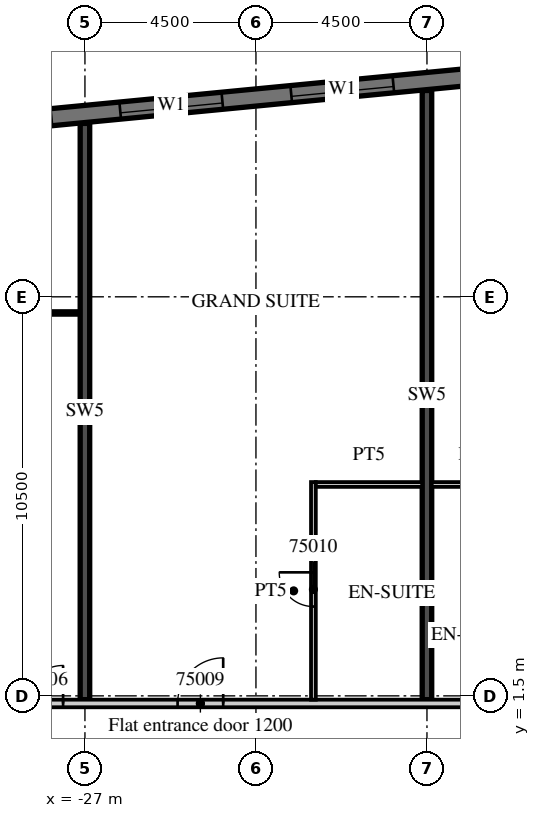
"""IFC4 building model, lengths in metres.
Left out: names, types, materials, properties, quantities, classifications, styles, units other than length and angle.
Written with IfcOpenShell. Run it as: python <this file> out.ifc"""

import sys

from ifc_helpers import new_model, si_unit, direction, frame, frame_2d, origin, place, context, subcontext, project, spatial, rectangle, extrude, element, fill, save


model = new_model("IFC4")
c1 = context("Model", 3, precision=1e-05, world=origin(), true_north=direction((0.0, 1.0)))
c2 = subcontext(c1, "Body", "Model", "MODEL_VIEW")
j1 = project(units=[si_unit("LENGTHUNIT", "METRE"), si_unit("PLANEANGLEUNIT", "RADIAN")], contexts=[c1])
p1 = place(None, origin())
s1 = spatial("IfcSite", under=j1, at=p1, CompositionType="ELEMENT")
p2 = place(p1, origin())
s2 = spatial("IfcBuilding", under=s1, at=p2, CompositionType="ELEMENT")
p3 = place(p2, frame((0.0, 0.0, 298.2)))
s3 = spatial("IfcBuildingStorey", under=s2, at=p3, CompositionType="ELEMENT", Elevation=298.2)
p4 = place(p3, frame((-27.0, 1.4, 0.0), z_axis=(0.0, 0.0, 1.0), x_axis=(0.0, 1.0, 0.0)))
e1 = element("IfcWall", 1, at=p4, inside=s3, PredefinedType="SHEAR", context=c2, shape_type="SweptSolid", body=[
    extrude(rectangle(XDim=15.163, YDim=0.25, at=frame_2d((7.582, 0.0))), origin(), (0.0, 0.0, 1.0), 3.3),
])
p5 = place(p3, frame((-18.0, 1.4, 0.0), z_axis=(0.0, 0.0, 1.0), x_axis=(0.0, 1.0, 0.0)))
e2 = element("IfcWall", 2, at=p5, inside=s3, PredefinedType="SHEAR", context=c2, shape_type="SweptSolid", body=[
    extrude(rectangle(XDim=16.03, YDim=0.25, at=frame_2d((8.015, 0.0))), origin(), (0.0, 0.0, 1.0), 3.3),
])
p6 = place(p3, frame((13.521, 20.713, 0.0), z_axis=(0.0, 0.0, 1.0), x_axis=(-0.995396277313, -0.095844932638, 0.0)))
e3 = element("IfcWall", 3, at=p6, inside=s3, PredefinedType="SOLIDWALL", context=c2, shape_type="SweptSolid", body=[
    extrude(rectangle(XDim=51.495, YDim=0.45, at=frame_2d((25.748, 0.0))), origin(), (0.0, 0.0, 1.0), 3.02),
])
p7 = place(p6, frame((0.91, 0.0, 0.45)))
e4 = element("IfcOpeningElement", 4, at=p7, cuts=e3, PredefinedType="OPENING", context=c2, shape_type="SweptSolid", body=[
    extrude(rectangle(XDim=2.7, YDim=2.25, at=frame_2d((1.35, 1.125))), frame((0.0, 0.235, 0.0), z_axis=(0.0, -1.0, 0.0), x_axis=(1.0, 0.0, 0.0)), (0.0, 0.0, 1.0), 0.47),
])
p8 = place(p6, frame((5.431, 0.0, 0.45)))
e5 = element("IfcOpeningElement", 5, at=p8, cuts=e3, PredefinedType="OPENING", context=c2, shape_type="SweptSolid", body=[
    extrude(rectangle(XDim=2.7, YDim=2.25, at=frame_2d((1.35, 1.125))), frame((0.0, 0.235, 0.0), z_axis=(0.0, -1.0, 0.0), x_axis=(1.0, 0.0, 0.0)), (0.0, 0.0, 1.0), 0.47),
])
p9 = place(p6, frame((9.952, 0.0, 0.45)))
e6 = element("IfcOpeningElement", 6, at=p9, cuts=e3, PredefinedType="OPENING", context=c2, shape_type="SweptSolid", body=[
    extrude(rectangle(XDim=2.7, YDim=2.25, at=frame_2d((1.35, 1.125))), frame((0.0, 0.235, 0.0), z_axis=(0.0, -1.0, 0.0), x_axis=(1.0, 0.0, 0.0)), (0.0, 0.0, 1.0), 0.47),
])
p10 = place(p6, frame((14.473, 0.0, 0.45)))
e7 = element("IfcOpeningElement", 7, at=p10, cuts=e3, PredefinedType="OPENING", context=c2, shape_type="SweptSolid", body=[
    extrude(rectangle(XDim=2.7, YDim=2.25, at=frame_2d((1.35, 1.125))), frame((0.0, 0.235, 0.0), z_axis=(0.0, -1.0, 0.0), x_axis=(1.0, 0.0, 0.0)), (0.0, 0.0, 1.0), 0.47),
])
p11 = place(p6, frame((18.994, 0.0, 0.45)))
e8 = element("IfcOpeningElement", 8, at=p11, cuts=e3, PredefinedType="OPENING", context=c2, shape_type="SweptSolid", body=[
    extrude(rectangle(XDim=2.7, YDim=2.25, at=frame_2d((1.35, 1.125))), frame((0.0, 0.235, 0.0), z_axis=(0.0, -1.0, 0.0), x_axis=(1.0, 0.0, 0.0)), (0.0, 0.0, 1.0), 0.47),
])
p12 = place(p6, frame((23.514, 0.0, 0.45)))
e9 = element("IfcOpeningElement", 9, at=p12, cuts=e3, PredefinedType="OPENING", context=c2, shape_type="SweptSolid", body=[
    extrude(rectangle(XDim=2.7, YDim=2.25, at=frame_2d((1.35, 1.125))), frame((0.0, 0.235, 0.0), z_axis=(0.0, -1.0, 0.0), x_axis=(1.0, 0.0, 0.0)), (0.0, 0.0, 1.0), 0.47),
])
p13 = place(p6, frame((28.035, 0.0, 0.45)))
e10 = element("IfcOpeningElement", 10, at=p13, cuts=e3, PredefinedType="OPENING", context=c2, shape_type="SweptSolid", body=[
    extrude(rectangle(XDim=2.7, YDim=2.25, at=frame_2d((1.35, 1.125))), frame((0.0, 0.235, 0.0), z_axis=(0.0, -1.0, 0.0), x_axis=(1.0, 0.0, 0.0)), (0.0, 0.0, 1.0), 0.47),
])
p14 = place(p6, frame((32.556, 0.0, 0.45)))
e11 = element("IfcOpeningElement", 11, at=p14, cuts=e3, PredefinedType="OPENING", context=c2, shape_type="SweptSolid", body=[
    extrude(rectangle(XDim=2.7, YDim=2.25, at=frame_2d((1.35, 1.125))), frame((0.0, 0.235, 0.0), z_axis=(0.0, -1.0, 0.0), x_axis=(1.0, 0.0, 0.0)), (0.0, 0.0, 1.0), 0.47),
])
p15 = place(p6, frame((37.077, 0.0, 0.45)))
e12 = element("IfcOpeningElement", 12, at=p15, cuts=e3, PredefinedType="OPENING", context=c2, shape_type="SweptSolid", body=[
    extrude(rectangle(XDim=2.7, YDim=2.25, at=frame_2d((1.35, 1.125))), frame((0.0, 0.235, 0.0), z_axis=(0.0, -1.0, 0.0), x_axis=(1.0, 0.0, 0.0)), (0.0, 0.0, 1.0), 0.47),
])
p16 = place(p6, frame((41.598, 0.0, 0.45)))
e13 = element("IfcOpeningElement", 13, at=p16, cuts=e3, PredefinedType="OPENING", context=c2, shape_type="SweptSolid", body=[
    extrude(rectangle(XDim=2.7, YDim=2.25, at=frame_2d((1.35, 1.125))), frame((0.0, 0.235, 0.0), z_axis=(0.0, -1.0, 0.0), x_axis=(1.0, 0.0, 0.0)), (0.0, 0.0, 1.0), 0.47),
])
p17 = place(p6, frame((46.118, 0.0, 0.45)))
e14 = element("IfcOpeningElement", 14, at=p17, cuts=e3, PredefinedType="OPENING", context=c2, shape_type="SweptSolid", body=[
    extrude(rectangle(XDim=2.7, YDim=2.25, at=frame_2d((1.35, 1.125))), frame((0.0, 0.235, 0.0), z_axis=(0.0, -1.0, 0.0), x_axis=(1.0, 0.0, 0.0)), (0.0, 0.0, 1.0), 0.47),
])
p18 = place(p3, frame((-39.909, 1.3, 0.0), z_axis=(0.0, 0.0, 1.0), x_axis=(1.0, 0.0, 0.0)))
e15 = element("IfcWall", 15, at=p18, inside=s3, PredefinedType="PARTITIONING", context=c2, shape_type="SweptSolid", body=[
    extrude(rectangle(XDim=53.409, YDim=0.2, at=frame_2d((26.705, 0.0))), origin(), (0.0, 0.0, 1.0), 3.02),
])
p19 = place(p18, frame((0.255, 0.0, 0.0)))
e16 = element("IfcOpeningElement", 16, at=p19, cuts=e15, PredefinedType="OPENING", context=c2, shape_type="SweptSolid", body=[
    extrude(rectangle(XDim=0.9, YDim=2.1, at=frame_2d((0.45, 1.05))), frame((0.0, 0.11, 0.0), z_axis=(0.0, -1.0, 0.0), x_axis=(1.0, 0.0, 0.0)), (0.0, 0.0, 1.0), 0.22),
])
p20 = place(p18, frame((4.484, 0.0, 0.0)))
e17 = element("IfcOpeningElement", 17, at=p20, cuts=e15, PredefinedType="OPENING", context=c2, shape_type="SweptSolid", body=[
    extrude(rectangle(XDim=1.0, YDim=2.1, at=frame_2d((0.5, 1.05))), frame((0.0, 0.11, 0.0), z_axis=(0.0, -1.0, 0.0), x_axis=(1.0, 0.0, 0.0)), (0.0, 0.0, 1.0), 0.22),
])
p21 = place(p18, frame((11.334, 0.0, 0.0)))
e18 = element("IfcOpeningElement", 18, at=p21, cuts=e15, PredefinedType="OPENING", context=c2, shape_type="SweptSolid", body=[
    extrude(rectangle(XDim=1.0, YDim=2.1, at=frame_2d((0.5, 1.05))), frame((0.0, 0.11, 0.0), z_axis=(0.0, -1.0, 0.0), x_axis=(1.0, 0.0, 0.0)), (0.0, 0.0, 1.0), 0.22),
])
p22 = place(p18, frame((15.347, 0.0, 0.0)))
e19 = element("IfcOpeningElement", 19, at=p22, cuts=e15, PredefinedType="OPENING", context=c2, shape_type="SweptSolid", body=[
    extrude(rectangle(XDim=1.2, YDim=2.1, at=frame_2d((0.6, 1.05))), frame((0.0, 0.11, 0.0), z_axis=(0.0, -1.0, 0.0), x_axis=(1.0, 0.0, 0.0)), (0.0, 0.0, 1.0), 0.22),
])
p23 = place(p18, frame((24.859, 0.0, 0.0)))
e20 = element("IfcOpeningElement", 20, at=p23, cuts=e15, PredefinedType="OPENING", context=c2, shape_type="SweptSolid", body=[
    extrude(rectangle(XDim=1.0, YDim=2.1, at=frame_2d((0.5, 1.05))), frame((0.0, 0.11, 0.0), z_axis=(0.0, -1.0, 0.0), x_axis=(1.0, 0.0, 0.0)), (0.0, 0.0, 1.0), 0.22),
])
p24 = place(p18, frame((26.959, 0.0, 0.0)))
e21 = element("IfcOpeningElement", 21, at=p24, cuts=e15, PredefinedType="OPENING", context=c2, shape_type="SweptSolid", body=[
    extrude(rectangle(XDim=1.0, YDim=2.1, at=frame_2d((0.5, 1.05))), frame((0.0, 0.11, 0.0), z_axis=(0.0, -1.0, 0.0), x_axis=(1.0, 0.0, 0.0)), (0.0, 0.0, 1.0), 0.22),
])
p25 = place(p18, frame((33.346, 0.0, 0.0)))
e22 = element("IfcOpeningElement", 22, at=p25, cuts=e15, PredefinedType="OPENING", context=c2, shape_type="SweptSolid", body=[
    extrude(rectangle(XDim=1.2, YDim=2.1, at=frame_2d((0.6, 1.05))), frame((0.0, 0.11, 0.0), z_axis=(0.0, -1.0, 0.0), x_axis=(1.0, 0.0, 0.0)), (0.0, 0.0, 1.0), 0.22),
])
p26 = place(p18, frame((42.859, 0.0, 0.0)))
e23 = element("IfcOpeningElement", 23, at=p26, cuts=e15, PredefinedType="OPENING", context=c2, shape_type="SweptSolid", body=[
    extrude(rectangle(XDim=1.0, YDim=2.1, at=frame_2d((0.5, 1.05))), frame((0.0, 0.11, 0.0), z_axis=(0.0, -1.0, 0.0), x_axis=(1.0, 0.0, 0.0)), (0.0, 0.0, 1.0), 0.22),
])
p27 = place(p18, frame((44.959, 0.0, 0.0)))
e24 = element("IfcOpeningElement", 24, at=p27, cuts=e15, PredefinedType="OPENING", context=c2, shape_type="SweptSolid", body=[
    extrude(rectangle(XDim=1.0, YDim=2.1, at=frame_2d((0.5, 1.05))), frame((0.0, 0.11, 0.0), z_axis=(0.0, -1.0, 0.0), x_axis=(1.0, 0.0, 0.0)), (0.0, 0.0, 1.0), 0.22),
])
p28 = place(p18, frame((49.484, 0.0, 0.0)))
e25 = element("IfcOpeningElement", 25, at=p28, cuts=e15, PredefinedType="OPENING", context=c2, shape_type="SweptSolid", body=[
    extrude(rectangle(XDim=1.0, YDim=2.1, at=frame_2d((0.5, 1.05))), frame((0.0, 0.11, 0.0), z_axis=(0.0, -1.0, 0.0), x_axis=(1.0, 0.0, 0.0)), (0.0, 0.0, 1.0), 0.22),
])
p29 = place(p3, frame((-31.4, 11.575, 0.0), z_axis=(0.0, 0.0, 1.0), x_axis=(1.0, 0.0, 0.0)))
e26 = element("IfcWall", 26, at=p29, inside=s3, PredefinedType="PARTITIONING", context=c2, shape_type="SweptSolid", body=[
    extrude(rectangle(XDim=4.275, YDim=0.1, at=frame_2d((2.137, 0.0))), origin(), (0.0, 0.0, 1.0), 3.02),
])
p30 = place(p29, frame((0.787, 0.0, 0.0)))
e27 = element("IfcOpeningElement", 27, at=p30, cuts=e26, PredefinedType="OPENING", context=c2, shape_type="SweptSolid", body=[
    extrude(rectangle(XDim=1.5, YDim=2.1, at=frame_2d((0.75, 1.05))), frame((0.0, 0.06, 0.0), z_axis=(0.0, -1.0, 0.0), x_axis=(1.0, 0.0, 0.0)), (0.0, 0.0, 1.0), 0.12),
])
p31 = place(p3, frame((-20.988, 1.4, 0.0), z_axis=(0.0, 0.0, 1.0), x_axis=(0.0, 1.0, 0.0)))
e28 = element("IfcWall", 28, at=p31, inside=s3, PredefinedType="PARTITIONING", context=c2, shape_type="SweptSolid", body=[
    extrude(rectangle(XDim=5.725, YDim=0.125, at=frame_2d((2.863, 0.0))), origin(), (0.0, 0.0, 1.0), 3.02),
])
p32 = place(p31, frame((2.45, 0.0, 0.0)))
e29 = element("IfcOpeningElement", 29, at=p32, cuts=e28, PredefinedType="OPENING", context=c2, shape_type="SweptSolid", body=[
    extrude(rectangle(XDim=0.9, YDim=2.1, at=frame_2d((0.45, 1.05))), frame((0.0, 0.073, 0.0), z_axis=(0.0, -1.0, 0.0), x_axis=(1.0, 0.0, 0.0)), (0.0, 0.0, 1.0), 0.145),
])
p33 = place(p3, frame((-20.925, 7.062, 0.0), z_axis=(0.0, 0.0, 1.0), x_axis=(1.0, 0.0, 0.0)))
e30 = element("IfcWall", 30, at=p33, inside=s3, PredefinedType="PARTITIONING", context=c2, shape_type="SweptSolid", body=[
    extrude(rectangle(XDim=2.8, YDim=0.125, at=frame_2d((1.4, 0.0))), origin(), (0.0, 0.0, 1.0), 3.02),
])
p34 = place(p3, frame((-17.875, 7.062, 0.0), z_axis=(0.0, 0.0, 1.0), x_axis=(1.0, 0.0, 0.0)))
e31 = element("IfcWall", 31, at=p34, inside=s3, PredefinedType="PARTITIONING", context=c2, shape_type="SweptSolid", body=[
    extrude(rectangle(XDim=2.25, YDim=0.125, at=frame_2d((1.125, 0.0))), origin(), (0.0, 0.0, 1.0), 3.02),
])
p35 = place(p14, origin())
e32 = element("IfcWindow", 32, at=p35, inside=s3, PartitioningType="SINGLE_PANEL", PredefinedType="WINDOW", context=c2, shape_type="SweptSolid", body=[
    extrude(rectangle(XDim=2.7, YDim=2.25, at=frame_2d((1.35, 1.125))), frame((0.0, 0.09, 0.0), z_axis=(0.0, -1.0, 0.0), x_axis=(1.0, 0.0, 0.0)), (0.0, 0.0, 1.0), 0.06),
])
fill(e11, e32)
p36 = place(p15, origin())
e33 = element("IfcWindow", 33, at=p36, inside=s3, PartitioningType="SINGLE_PANEL", PredefinedType="WINDOW", context=c2, shape_type="SweptSolid", body=[
    extrude(rectangle(XDim=2.7, YDim=2.25, at=frame_2d((1.35, 1.125))), frame((0.0, 0.09, 0.0), z_axis=(0.0, -1.0, 0.0), x_axis=(1.0, 0.0, 0.0)), (0.0, 0.0, 1.0), 0.06),
])
fill(e12, e33)
p37 = place(p21, origin())
e34 = element("IfcDoor", 34, at=p37, inside=s3, OperationType="SINGLE_SWING_RIGHT", PredefinedType="DOOR", context=c2, shape_type="SweptSolid", body=[
    extrude(rectangle(XDim=1.0, YDim=2.1, at=frame_2d((0.5, 1.05))), frame((0.0, 0.025, 0.0), z_axis=(0.0, -1.0, 0.0), x_axis=(1.0, 0.0, 0.0)), (0.0, 0.0, 1.0), 0.05),
])
fill(e18, e34)
p38 = place(p22, origin())
e35 = element("IfcDoor", 35, at=p38, inside=s3, OperationType="SINGLE_SWING_RIGHT", PredefinedType="DOOR", context=c2, shape_type="SweptSolid", body=[
    extrude(rectangle(XDim=1.2, YDim=2.1, at=frame_2d((0.6, 1.05))), frame((0.0, 0.025, 0.0), z_axis=(0.0, -1.0, 0.0), x_axis=(1.0, 0.0, 0.0)), (0.0, 0.0, 1.0), 0.05),
])
fill(e19, e35)
p39 = place(p32, origin())
e36 = element("IfcDoor", 36, at=p39, inside=s3, OperationType="SINGLE_SWING_RIGHT", PredefinedType="DOOR", context=c2, shape_type="SweptSolid", body=[
    extrude(rectangle(XDim=0.9, YDim=2.1, at=frame_2d((0.45, 1.05))), frame((0.0, 0.025, 0.0), z_axis=(0.0, -1.0, 0.0), x_axis=(1.0, 0.0, 0.0)), (0.0, 0.0, 1.0), 0.05),
])
fill(e29, e36)
save(model, sys.argv[1])
